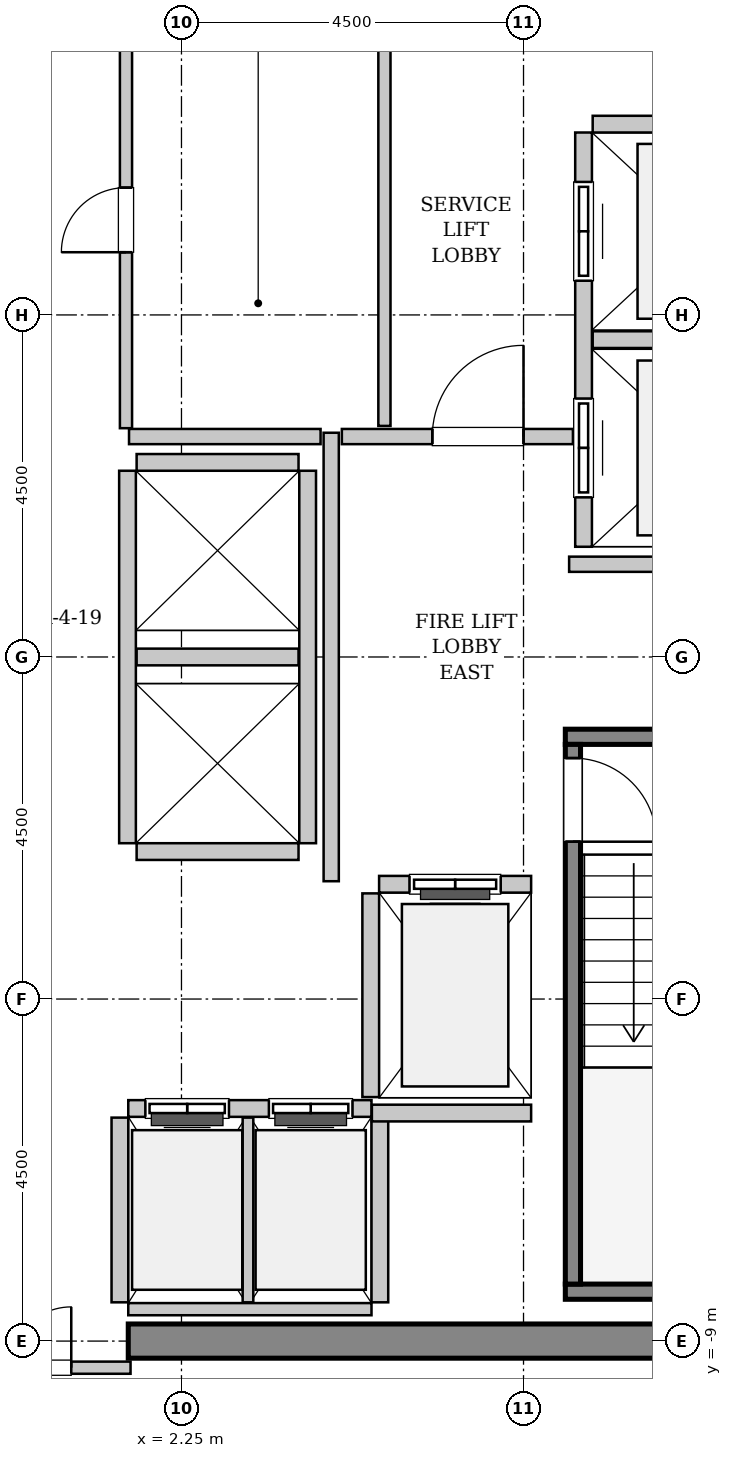
"""IFC4 building model, lengths in metres.
Left out: names, types, materials, properties, quantities, classifications, styles, units other than length and angle.
Written with IfcOpenShell. Run it as: python <this file> out.ifc"""

import sys

from ifc_helpers import new_model, si_unit, direction, frame, frame_2d, origin, place, context, subcontext, project, spatial, rectangle, extrude, source, transform, mapped, element, fill, save


model = new_model("IFC4")
c1 = context("Model", 3, precision=1e-05, world=origin(), true_north=direction((0.0, 1.0)))
c2 = subcontext(c1, "Body", "Model", "MODEL_VIEW")
j1 = project(units=[si_unit("LENGTHUNIT", "METRE"), si_unit("PLANEANGLEUNIT", "RADIAN")], contexts=[c1])
p1 = place(None, origin())
s1 = spatial("IfcSite", under=j1, at=p1, CompositionType="ELEMENT")
p2 = place(p1, origin())
s2 = spatial("IfcBuilding", under=s1, at=p2, CompositionType="ELEMENT")
p3 = place(p2, frame((0.0, 0.0, 244.6)))
s3 = spatial("IfcBuildingStorey", under=s2, at=p3, CompositionType="ELEMENT", Elevation=244.6)
m1 = source(origin(), c2, "Body", "SweptSolid", [
    extrude(rectangle(XDim=9.925, YDim=0.45, at=frame_2d((4.962, 0.0))), origin(), (0.0, 0.0, 1.0), 3.8),
])
p4 = place(p3, frame((1.55, -9.0, 0.0), z_axis=(0.0, 0.0, 1.0), x_axis=(1.0, 0.0, 0.0)))
e1 = element("IfcWall", 1, at=p4, inside=s3, PredefinedType="SHEAR", context=c2, shape_type="MappedRepresentation", body=[
    mapped(m1, transform((0.0, 0.0, 0.0), x_axis=(1.0, 0.0, 0.0), y_axis=(0.0, 1.0, 0.0), z_axis=(0.0, 0.0, 1.0), scale=1.0)),
])
m2 = source(origin(), c2, "Body", "SweptSolid", [
    extrude(rectangle(XDim=3.4, YDim=0.2, at=frame_2d((1.7, 0.0))), origin(), (0.0, 0.0, 1.0), 3.8),
])
p5 = place(p3, frame((7.3, -1.05, 0.0), z_axis=(0.0, 0.0, 1.0), x_axis=(1.0, 0.0, 0.0)))
e2 = element("IfcWall", 2, at=p5, inside=s3, PredefinedType="SOLIDWALL", context=c2, shape_type="MappedRepresentation", body=[
    mapped(m2, transform((0.0, 0.0, 0.0), x_axis=(1.0, 0.0, 0.0), y_axis=(0.0, 1.0, 0.0), z_axis=(0.0, 0.0, 1.0), scale=1.0)),
])
m3 = source(origin(), c2, "Body", "SweptSolid", [
    extrude(rectangle(XDim=3.73, YDim=0.2, at=frame_2d((1.865, 0.0))), origin(), (0.0, 0.0, 1.0), 3.8),
])
p6 = place(p3, frame((7.3, -8.35, 0.0), z_axis=(0.0, 0.0, 1.0), x_axis=(1.0, 0.0, 0.0)))
e3 = element("IfcWall", 3, at=p6, inside=s3, PredefinedType="SOLIDWALL", context=c2, shape_type="MappedRepresentation", body=[
    mapped(m3, transform((0.0, 0.0, 0.0), x_axis=(1.0, 0.0, 0.0), y_axis=(0.0, 1.0, 0.0), z_axis=(0.0, 0.0, 1.0), scale=1.0)),
])
m4 = source(origin(), c2, "Body", "SweptSolid", [
    extrude(rectangle(XDim=7.1, YDim=0.2, at=frame_2d((3.55, 0.0))), origin(), (0.0, 0.0, 1.0), 3.8),
])
p7 = place(p3, frame((7.4, -1.15, 0.0), z_axis=(0.0, 0.0, 1.0), x_axis=(0.0, -1.0, 0.0)))
e4 = element("IfcWall", 4, at=p7, inside=s3, PredefinedType="SOLIDWALL", context=c2, shape_type="MappedRepresentation", body=[
    mapped(m4, transform((0.0, 0.0, 0.0), x_axis=(1.0, 0.0, 0.0), y_axis=(0.0, 1.0, 0.0), z_axis=(0.0, 0.0, 1.0), scale=1.0)),
])
p8 = place(p7, frame((0.18, 0.0, 0.0)))
e5 = element("IfcOpeningElement", 5, at=p8, cuts=e4, PredefinedType="OPENING", context=c2, shape_type="SweptSolid", body=[
    extrude(rectangle(XDim=1.1, YDim=2.15, at=frame_2d((0.55, 1.075))), frame((0.0, 0.11, 0.0), z_axis=(0.0, -1.0, 0.0), x_axis=(1.0, 0.0, 0.0)), (0.0, 0.0, 1.0), 0.22),
])
m5 = source(origin(), c2, "Body", "SweptSolid", [
    extrude(rectangle(XDim=2.0, YDim=0.22, at=frame_2d((1.0, 0.0))), origin(), (0.0, 0.0, 1.0), 3.535),
])
p9 = place(p3, frame((6.85, -2.99, 0.0), z_axis=(0.0, 0.0, 1.0), x_axis=(-1.0, 0.0, 0.0)))
e6 = element("IfcWall", 6, at=p9, inside=s3, PredefinedType="SOLIDWALL", context=c2, shape_type="MappedRepresentation", body=[
    mapped(m5, transform((0.0, 0.0, 0.0), x_axis=(1.0, 0.0, 0.0), y_axis=(0.0, 1.0, 0.0), z_axis=(0.0, 0.0, 1.0), scale=1.0)),
])
p10 = place(p9, frame((0.4, 0.0, 0.0)))
e7 = element("IfcOpeningElement", 7, at=p10, cuts=e6, PredefinedType="OPENING", context=c2, shape_type="SweptSolid", body=[
    extrude(rectangle(XDim=1.2, YDim=2.2, at=frame_2d((0.6, 1.1))), frame((0.0, 0.12, 0.0), z_axis=(0.0, -1.0, 0.0), x_axis=(1.0, 0.0, 0.0)), (0.0, 0.0, 1.0), 0.24),
])
m6 = source(origin(), c2, "Body", "SweptSolid", [
    extrude(rectangle(XDim=2.68, YDim=0.22, at=frame_2d((1.34, 0.0))), origin(), (0.0, 0.0, 1.0), 3.535),
])
p11 = place(p3, frame((4.74, -3.11, 0.0), z_axis=(0.0, 0.0, 1.0), x_axis=(0.0, -1.0, 0.0)))
e8 = element("IfcWall", 8, at=p11, inside=s3, PredefinedType="SOLIDWALL", context=c2, shape_type="MappedRepresentation", body=[
    mapped(m6, transform((0.0, 0.0, 0.0), x_axis=(1.0, 0.0, 0.0), y_axis=(0.0, 1.0, 0.0), z_axis=(0.0, 0.0, 1.0), scale=1.0)),
])
m7 = source(origin(), c2, "Body", "SweptSolid", [
    extrude(rectangle(XDim=5.45, YDim=0.22, at=frame_2d((2.725, 0.0))), origin(), (0.0, 0.0, 1.0), 3.535),
])
p12 = place(p3, frame((7.54, 6.9, 0.0), z_axis=(0.0, 0.0, 1.0), x_axis=(0.0, -1.0, 0.0)))
e9 = element("IfcWall", 9, at=p12, inside=s3, PredefinedType="SOLIDWALL", context=c2, shape_type="MappedRepresentation", body=[
    mapped(m7, transform((0.0, 0.0, 0.0), x_axis=(1.0, 0.0, 0.0), y_axis=(0.0, 1.0, 0.0), z_axis=(0.0, 0.0, 1.0), scale=1.0)),
])
p13 = place(p12, frame((3.5, 0.0, 0.0)))
e10 = element("IfcOpeningElement", 10, at=p13, cuts=e9, PredefinedType="OPENING", context=c2, shape_type="SweptSolid", body=[
    extrude(rectangle(XDim=1.3, YDim=2.3, at=frame_2d((0.65, 1.15))), frame((0.0, 0.12, 0.0), z_axis=(0.0, -1.0, 0.0), x_axis=(1.0, 0.0, 0.0)), (0.0, 0.0, 1.0), 0.24),
])
p14 = place(p12, frame((0.65, 0.0, 0.0)))
e11 = element("IfcOpeningElement", 11, at=p14, cuts=e9, PredefinedType="OPENING", context=c2, shape_type="SweptSolid", body=[
    extrude(rectangle(XDim=1.3, YDim=2.3, at=frame_2d((0.65, 1.15))), frame((0.0, 0.12, 0.0), z_axis=(0.0, -1.0, 0.0), x_axis=(1.0, 0.0, 0.0)), (0.0, 0.0, 1.0), 0.24),
])
m8 = source(origin(), c2, "Body", "SweptSolid", [
    extrude(rectangle(XDim=2.78, YDim=0.22, at=frame_2d((1.39, 0.0))), origin(), (0.0, 0.0, 1.0), 3.535),
])
for number, where, z_axis, x_axis in (
    (12, (7.66, 4.175, 0.0), (0.0, 0.0, 1.0), (1.0, 0.0, 0.0)),
    (13, (10.44, 7.01, 0.0), (0.0, 0.0, 1.0), (-1.0, 0.0, 0.0)),
):
    element("IfcWall", number, at=place(p3, frame(where, z_axis=z_axis, x_axis=x_axis)), inside=s3, PredefinedType="SOLIDWALL", context=c2, shape_type="MappedRepresentation", body=[
        mapped(m8, transform((0.0, 0.0, 0.0), x_axis=(1.0, 0.0, 0.0), y_axis=(0.0, 1.0, 0.0), z_axis=(0.0, 0.0, 1.0), scale=1.0)),
    ])
m9 = source(origin(), c2, "Body", "SweptSolid", [
    extrude(rectangle(XDim=3.2, YDim=0.22, at=frame_2d((1.6, 0.0))), origin(), (0.0, 0.0, 1.0), 3.535),
])
p15 = place(p3, frame((4.75, -5.94, 0.0), z_axis=(0.0, 0.0, 1.0), x_axis=(-1.0, 0.0, 0.0)))
e14 = element("IfcWall", 14, at=p15, inside=s3, PredefinedType="SOLIDWALL", context=c2, shape_type="MappedRepresentation", body=[
    mapped(m9, transform((0.0, 0.0, 0.0), x_axis=(1.0, 0.0, 0.0), y_axis=(0.0, 1.0, 0.0), z_axis=(0.0, 0.0, 1.0), scale=1.0)),
])
p16 = place(p15, frame((1.875, 0.0, 0.0)))
e15 = element("IfcOpeningElement", 15, at=p16, cuts=e14, PredefinedType="OPENING", context=c2, shape_type="SweptSolid", body=[
    extrude(rectangle(XDim=1.1, YDim=2.2, at=frame_2d((0.55, 1.1))), frame((0.0, 0.12, 0.0), z_axis=(0.0, -1.0, 0.0), x_axis=(1.0, 0.0, 0.0)), (0.0, 0.0, 1.0), 0.24),
])
p17 = place(p15, frame((0.25, 0.0, 0.0)))
e16 = element("IfcOpeningElement", 16, at=p17, cuts=e14, PredefinedType="OPENING", context=c2, shape_type="SweptSolid", body=[
    extrude(rectangle(XDim=1.1, YDim=2.2, at=frame_2d((0.55, 1.1))), frame((0.0, 0.12, 0.0), z_axis=(0.0, -1.0, 0.0), x_axis=(1.0, 0.0, 0.0)), (0.0, 0.0, 1.0), 0.24),
])
m10 = source(origin(), c2, "Body", "SweptSolid", [
    extrude(rectangle(XDim=3.2, YDim=0.16, at=frame_2d((1.6, 0.0))), origin(), (0.0, 0.0, 1.0), 2.625),
])
p18 = place(p3, frame((1.55, -8.58, 0.0), z_axis=(0.0, 0.0, 1.0), x_axis=(1.0, 0.0, 0.0)))
e17 = element("IfcWall", 17, at=p18, inside=s3, PredefinedType="PARTITIONING", context=c2, shape_type="MappedRepresentation", body=[
    mapped(m10, transform((0.0, 0.0, 0.0), x_axis=(1.0, 0.0, 0.0), y_axis=(0.0, 1.0, 0.0), z_axis=(0.0, 0.0, 1.0), scale=1.0)),
])
m11 = source(origin(), c2, "Body", "SweptSolid", [
    extrude(rectangle(XDim=2.43, YDim=0.22, at=frame_2d((1.215, 0.0))), origin(), (0.0, 0.0, 1.0), 3.535),
])
p19 = place(p3, frame((1.44, -6.06, 0.0), z_axis=(0.0, 0.0, 1.0), x_axis=(0.0, -1.0, 0.0)))
e18 = element("IfcWall", 18, at=p19, inside=s3, PredefinedType="SOLIDWALL", context=c2, shape_type="MappedRepresentation", body=[
    mapped(m11, transform((0.0, 0.0, 0.0), x_axis=(1.0, 0.0, 0.0), y_axis=(0.0, 1.0, 0.0), z_axis=(0.0, 0.0, 1.0), scale=1.0)),
])
m12 = source(origin(), c2, "Body", "SweptSolid", [
    extrude(rectangle(XDim=2.43, YDim=0.14, at=frame_2d((1.215, 0.0))), origin(), (0.0, 0.0, 1.0), 3.535),
])
p20 = place(p3, frame((3.125, -8.49, 0.0), z_axis=(0.0, 0.0, 1.0), x_axis=(0.0, 1.0, 0.0)))
e19 = element("IfcWall", 19, at=p20, inside=s3, PredefinedType="PARTITIONING", context=c2, shape_type="MappedRepresentation", body=[
    mapped(m12, transform((0.0, 0.0, 0.0), x_axis=(1.0, 0.0, 0.0), y_axis=(0.0, 1.0, 0.0), z_axis=(0.0, 0.0, 1.0), scale=1.0)),
])
p21 = place(p3, frame((4.86, -8.49, 0.0), z_axis=(0.0, 0.0, 1.0), x_axis=(0.0, 1.0, 0.0)))
e20 = element("IfcWall", 20, at=p21, inside=s3, PredefinedType="SOLIDWALL", context=c2, shape_type="MappedRepresentation", body=[
    mapped(m11, transform((0.0, 0.0, 0.0), x_axis=(1.0, 0.0, 0.0), y_axis=(0.0, 1.0, 0.0), z_axis=(0.0, 0.0, 1.0), scale=1.0)),
])
m13 = source(origin(), c2, "Body", "SweptSolid", [
    extrude(rectangle(XDim=4.9, YDim=0.22, at=frame_2d((2.45, 0.0))), origin(), (0.0, 0.0, 1.0), 3.535),
])
for number, where, z_axis, x_axis in (
    (21, (1.54, 2.45, 0.0), (0.0, 0.0, 1.0), (0.0, -1.0, 0.0)),
    (22, (3.91, -2.45, 0.0), (0.0, 0.0, 1.0), (0.0, 1.0, 0.0)),
):
    element("IfcWall", number, at=place(p3, frame(where, z_axis=z_axis, x_axis=x_axis)), inside=s3, PredefinedType="SOLIDWALL", context=c2, shape_type="MappedRepresentation", body=[
        mapped(m13, transform((0.0, 0.0, 0.0), x_axis=(1.0, 0.0, 0.0), y_axis=(0.0, 1.0, 0.0), z_axis=(0.0, 0.0, 1.0), scale=1.0)),
    ])
m14 = source(origin(), c2, "Body", "SweptSolid", [
    extrude(rectangle(XDim=2.13, YDim=0.22, at=frame_2d((1.065, 0.0))), origin(), (0.0, 0.0, 1.0), 3.535),
])
for number, where, z_axis, x_axis in (
    (23, (1.66, -2.56, 0.0), (0.0, 0.0, 1.0), (1.0, 0.0, 0.0)),
    (24, (1.66, 0.0, 0.0), (0.0, 0.0, 1.0), (1.0, 0.0, 0.0)),
    (25, (3.79, 2.56, 0.0), (0.0, 0.0, 1.0), (-1.0, 0.0, 0.0)),
):
    element("IfcWall", number, at=place(p3, frame(where, z_axis=z_axis, x_axis=x_axis)), inside=s3, PredefinedType="SOLIDWALL", context=c2, shape_type="MappedRepresentation", body=[
        mapped(m14, transform((0.0, 0.0, 0.0), x_axis=(1.0, 0.0, 0.0), y_axis=(0.0, 1.0, 0.0), z_axis=(0.0, 0.0, 1.0), scale=1.0)),
    ])
m15 = source(origin(), c2, "Body", "SweptSolid", [
    extrude(rectangle(XDim=2.095, YDim=0.22, at=frame_2d((1.048, 0.0))), origin(), (0.0, 0.0, 1.0), 3.535),
])
p22 = place(p3, frame((4.755, -6.0, 0.0), z_axis=(0.0, 0.0, 1.0), x_axis=(1.0, 0.0, 0.0)))
e26 = element("IfcWall", 26, at=p22, inside=s3, PredefinedType="SOLIDWALL", context=c2, shape_type="MappedRepresentation", body=[
    mapped(m15, transform((0.0, 0.0, 0.0), x_axis=(1.0, 0.0, 0.0), y_axis=(0.0, 1.0, 0.0), z_axis=(0.0, 0.0, 1.0), scale=1.0)),
])
m16 = source(origin(), c2, "Body", "SweptSolid", [
    extrude(rectangle(XDim=5.9, YDim=0.2, at=frame_2d((2.95, 0.0))), origin(), (0.0, 0.0, 1.0), 3.535),
])
p23 = place(p3, frame((4.22, -2.95, 0.0), z_axis=(0.0, 0.0, 1.0), x_axis=(0.0, 1.0, 0.0)))
e27 = element("IfcWall", 27, at=p23, inside=s3, PredefinedType="PARTITIONING", context=c2, shape_type="MappedRepresentation", body=[
    mapped(m16, transform((0.0, 0.0, 0.0), x_axis=(1.0, 0.0, 0.0), y_axis=(0.0, 1.0, 0.0), z_axis=(0.0, 0.0, 1.0), scale=1.0)),
])
m17 = source(origin(), c2, "Body", "SweptSolid", [
    extrude(rectangle(XDim=2.52, YDim=0.2, at=frame_2d((1.26, 0.0))), origin(), (0.0, 0.0, 1.0), 3.535),
])
p24 = place(p3, frame((1.56, 2.9, 0.0), z_axis=(0.0, 0.0, 1.0), x_axis=(1.0, 0.0, 0.0)))
e28 = element("IfcWall", 28, at=p24, inside=s3, PredefinedType="PARTITIONING", context=c2, shape_type="MappedRepresentation", body=[
    mapped(m17, transform((0.0, 0.0, 0.0), x_axis=(1.0, 0.0, 0.0), y_axis=(0.0, 1.0, 0.0), z_axis=(0.0, 0.0, 1.0), scale=1.0)),
])
m18 = source(origin(), c2, "Body", "SweptSolid", [
    extrude(rectangle(XDim=3.04, YDim=0.2, at=frame_2d((1.52, 0.0))), origin(), (0.0, 0.0, 1.0), 3.535),
])
p25 = place(p3, frame((4.36, 2.9, 0.0), z_axis=(0.0, 0.0, 1.0), x_axis=(1.0, 0.0, 0.0)))
e29 = element("IfcWall", 29, at=p25, inside=s3, PredefinedType="PARTITIONING", context=c2, shape_type="MappedRepresentation", body=[
    mapped(m18, transform((0.0, 0.0, 0.0), x_axis=(1.0, 0.0, 0.0), y_axis=(0.0, 1.0, 0.0), z_axis=(0.0, 0.0, 1.0), scale=1.0)),
])
p26 = place(p25, frame((1.19, 0.0, 0.0)))
e30 = element("IfcOpeningElement", 30, at=p26, cuts=e29, PredefinedType="OPENING", context=c2, shape_type="SweptSolid", body=[
    extrude(rectangle(XDim=1.2, YDim=2.15, at=frame_2d((0.6, 1.075))), frame((0.0, 0.11, 0.0), z_axis=(0.0, -1.0, 0.0), x_axis=(1.0, 0.0, 0.0)), (0.0, 0.0, 1.0), 0.22),
])
m19 = source(origin(), c2, "Body", "SweptSolid", [
    extrude(rectangle(XDim=4.11, YDim=0.2, at=frame_2d((2.055, 0.0))), origin(), (0.0, 0.0, 1.0), 3.535),
])
p27 = place(p3, frame((7.35, 1.22, 0.0), z_axis=(0.0, 0.0, 1.0), x_axis=(1.0, 0.0, 0.0)))
e31 = element("IfcWall", 31, at=p27, inside=s3, PredefinedType="PARTITIONING", context=c2, shape_type="MappedRepresentation", body=[
    mapped(m19, transform((0.0, 0.0, 0.0), x_axis=(1.0, 0.0, 0.0), y_axis=(0.0, 1.0, 0.0), z_axis=(0.0, 0.0, 1.0), scale=1.0)),
])
m20 = source(origin(), c2, "Body", "SweptSolid", [
    extrude(rectangle(XDim=3.16, YDim=0.16, at=frame_2d((1.58, 0.0))), origin(), (0.0, 0.0, 1.0), 2.625),
])
p28 = place(p3, frame((-1.58, -9.35, 0.0), z_axis=(0.0, 0.0, 1.0), x_axis=(1.0, 0.0, 0.0)))
e32 = element("IfcWall", 32, at=p28, inside=s3, PredefinedType="PARTITIONING", context=c2, shape_type="MappedRepresentation", body=[
    mapped(m20, transform((0.0, 0.0, 0.0), x_axis=(1.0, 0.0, 0.0), y_axis=(0.0, 1.0, 0.0), z_axis=(0.0, 0.0, 1.0), scale=1.0)),
])
p29 = place(p28, frame((0.78, 0.0, 0.0)))
e33 = element("IfcOpeningElement", 33, at=p29, cuts=e32, PredefinedType="OPENING", context=c2, shape_type="SweptSolid", body=[
    extrude(rectangle(XDim=1.6, YDim=2.3, at=frame_2d((0.8, 1.15))), frame((0.0, 0.09, 0.0), z_axis=(0.0, -1.0, 0.0), x_axis=(1.0, 0.0, 0.0)), (0.0, 0.0, 1.0), 0.18),
])
m21 = source(origin(), c2, "Body", "SweptSolid", [
    extrude(rectangle(XDim=5.45, YDim=0.16, at=frame_2d((2.725, 0.0))), origin(), (0.0, 0.0, 1.0), 3.535),
])
p30 = place(p3, frame((4.92, 3.04, 0.0), z_axis=(0.0, 0.0, 1.0), x_axis=(0.0, 1.0, 0.0)))
e34 = element("IfcWall", 34, at=p30, inside=s3, PredefinedType="PARTITIONING", context=c2, shape_type="MappedRepresentation", body=[
    mapped(m21, transform((0.0, 0.0, 0.0), x_axis=(1.0, 0.0, 0.0), y_axis=(0.0, 1.0, 0.0), z_axis=(0.0, 0.0, 1.0), scale=1.0)),
])
m22 = source(origin(), c2, "Body", "SweptSolid", [
    extrude(rectangle(XDim=5.48, YDim=0.16, at=frame_2d((2.74, 0.0))), origin(), (0.0, 0.0, 1.0), 3.535),
])
p31 = place(p3, frame((1.52, 3.01, 0.0), z_axis=(0.0, 0.0, 1.0), x_axis=(0.0, 1.0, 0.0)))
e35 = element("IfcWall", 35, at=p31, inside=s3, PredefinedType="PARTITIONING", context=c2, shape_type="MappedRepresentation", body=[
    mapped(m22, transform((0.0, 0.0, 0.0), x_axis=(1.0, 0.0, 0.0), y_axis=(0.0, 1.0, 0.0), z_axis=(0.0, 0.0, 1.0), scale=1.0)),
])
p32 = place(p31, frame((2.315, 0.0, 0.0)))
e36 = element("IfcOpeningElement", 36, at=p32, cuts=e35, PredefinedType="OPENING", context=c2, shape_type="SweptSolid", body=[
    extrude(rectangle(XDim=0.85, YDim=2.1, at=frame_2d((0.425, 1.05))), frame((0.0, 0.09, 0.0), z_axis=(0.0, -1.0, 0.0), x_axis=(1.0, 0.0, 0.0)), (0.0, 0.0, 1.0), 0.18),
])
m23 = source(origin(), c2, "Body", "SweptSolid", [
    extrude(rectangle(XDim=1.1, YDim=2.15, at=frame_2d((0.55, 1.075))), frame((0.0, 0.025, 0.0), z_axis=(0.0, -1.0, 0.0), x_axis=(1.0, 0.0, 0.0)), (0.0, 0.0, 1.0), 0.05),
])
p33 = place(p8, origin())
e37 = element("IfcDoor", 37, at=p33, inside=s3, OperationType="SINGLE_SWING_RIGHT", PredefinedType="DOOR", context=c2, shape_type="MappedRepresentation", body=[
    mapped(m23, transform((0.0, 0.0, 0.0), x_axis=(1.0, 0.0, 0.0), y_axis=(0.0, 1.0, 0.0), z_axis=(0.0, 0.0, 1.0), scale=1.0)),
])
fill(e5, e37)
m24 = source(origin(), c2, "Body", "SweptSolid", [
    extrude(rectangle(XDim=1.2, YDim=2.2, at=frame_2d((0.6, 1.1))), frame((0.0, 0.025, 0.0), z_axis=(0.0, -1.0, 0.0), x_axis=(1.0, 0.0, 0.0)), (0.0, 0.0, 1.0), 0.05),
])
p34 = place(p10, origin())
e38 = element("IfcDoor", 38, at=p34, inside=s3, OperationType="SLIDING_TO_LEFT", PredefinedType="DOOR", context=c2, shape_type="MappedRepresentation", body=[
    mapped(m24, transform((0.0, 0.0, 0.0), x_axis=(1.0, 0.0, 0.0), y_axis=(0.0, 1.0, 0.0), z_axis=(0.0, 0.0, 1.0), scale=1.0)),
])
fill(e7, e38)
m25 = source(origin(), c2, "Body", "SweptSolid", [
    extrude(rectangle(XDim=1.3, YDim=2.3, at=frame_2d((0.65, 1.15))), frame((0.0, 0.025, 0.0), z_axis=(0.0, -1.0, 0.0), x_axis=(1.0, 0.0, 0.0)), (0.0, 0.0, 1.0), 0.05),
])
p35 = place(p13, origin())
e39 = element("IfcDoor", 39, at=p35, inside=s3, OperationType="SLIDING_TO_RIGHT", PredefinedType="DOOR", context=c2, shape_type="MappedRepresentation", body=[
    mapped(m25, transform((0.0, 0.0, 0.0), x_axis=(1.0, 0.0, 0.0), y_axis=(0.0, 1.0, 0.0), z_axis=(0.0, 0.0, 1.0), scale=1.0)),
])
fill(e10, e39)
p36 = place(p14, origin())
e40 = element("IfcDoor", 40, at=p36, inside=s3, OperationType="SLIDING_TO_RIGHT", PredefinedType="DOOR", context=c2, shape_type="MappedRepresentation", body=[
    mapped(m25, transform((0.0, 0.0, 0.0), x_axis=(1.0, 0.0, 0.0), y_axis=(0.0, 1.0, 0.0), z_axis=(0.0, 0.0, 1.0), scale=1.0)),
])
fill(e11, e40)
m26 = source(origin(), c2, "Body", "SweptSolid", [
    extrude(rectangle(XDim=1.1, YDim=2.2, at=frame_2d((0.55, 1.1))), frame((0.0, 0.025, 0.0), z_axis=(0.0, -1.0, 0.0), x_axis=(1.0, 0.0, 0.0)), (0.0, 0.0, 1.0), 0.05),
])
p37 = place(p16, origin())
e41 = element("IfcDoor", 41, at=p37, inside=s3, OperationType="DOUBLE_DOOR_SLIDING", PredefinedType="DOOR", context=c2, shape_type="MappedRepresentation", body=[
    mapped(m26, transform((0.0, 0.0, 0.0), x_axis=(1.0, 0.0, 0.0), y_axis=(0.0, 1.0, 0.0), z_axis=(0.0, 0.0, 1.0), scale=1.0)),
])
fill(e15, e41)
p38 = place(p17, origin())
e42 = element("IfcDoor", 42, at=p38, inside=s3, OperationType="DOUBLE_DOOR_SLIDING", PredefinedType="DOOR", context=c2, shape_type="MappedRepresentation", body=[
    mapped(m26, transform((0.0, 0.0, 0.0), x_axis=(1.0, 0.0, 0.0), y_axis=(0.0, 1.0, 0.0), z_axis=(0.0, 0.0, 1.0), scale=1.0)),
])
fill(e16, e42)
m27 = source(origin(), c2, "Body", "SweptSolid", [
    extrude(rectangle(XDim=1.2, YDim=2.15, at=frame_2d((0.6, 1.075))), frame((0.0, 0.025, 0.0), z_axis=(0.0, -1.0, 0.0), x_axis=(1.0, 0.0, 0.0)), (0.0, 0.0, 1.0), 0.05),
])
p39 = place(p26, origin())
e43 = element("IfcDoor", 43, at=p39, inside=s3, OperationType="SINGLE_SWING_RIGHT", PredefinedType="DOOR", context=c2, shape_type="MappedRepresentation", body=[
    mapped(m27, transform((0.0, 0.0, 0.0), x_axis=(1.0, 0.0, 0.0), y_axis=(0.0, 1.0, 0.0), z_axis=(0.0, 0.0, 1.0), scale=1.0)),
])
fill(e30, e43)
m28 = source(origin(), c2, "Body", "SweptSolid", [
    extrude(rectangle(XDim=1.6, YDim=2.3, at=frame_2d((0.8, 1.15))), frame((0.0, 0.025, 0.0), z_axis=(0.0, -1.0, 0.0), x_axis=(1.0, 0.0, 0.0)), (0.0, 0.0, 1.0), 0.05),
])
p40 = place(p29, origin())
e44 = element("IfcDoor", 44, at=p40, inside=s3, OperationType="DOUBLE_DOOR_SINGLE_SWING", PredefinedType="DOOR", context=c2, shape_type="MappedRepresentation", body=[
    mapped(m28, transform((0.0, 0.0, 0.0), x_axis=(1.0, 0.0, 0.0), y_axis=(0.0, 1.0, 0.0), z_axis=(0.0, 0.0, 1.0), scale=1.0)),
])
fill(e33, e44)
m29 = source(origin(), c2, "Body", "SweptSolid", [
    extrude(rectangle(XDim=0.85, YDim=2.1, at=frame_2d((0.425, 1.05))), frame((0.0, 0.025, 0.0), z_axis=(0.0, -1.0, 0.0), x_axis=(1.0, 0.0, 0.0)), (0.0, 0.0, 1.0), 0.05),
])
p41 = place(p32, origin())
e45 = element("IfcDoor", 45, at=p41, inside=s3, OperationType="SINGLE_SWING_LEFT", PredefinedType="DOOR", context=c2, shape_type="MappedRepresentation", body=[
    mapped(m29, transform((0.0, 0.0, 0.0), x_axis=(1.0, 0.0, 0.0), y_axis=(0.0, 1.0, 0.0), z_axis=(0.0, 0.0, 1.0), scale=1.0)),
])
fill(e36, e45)
save(model, sys.argv[1])
